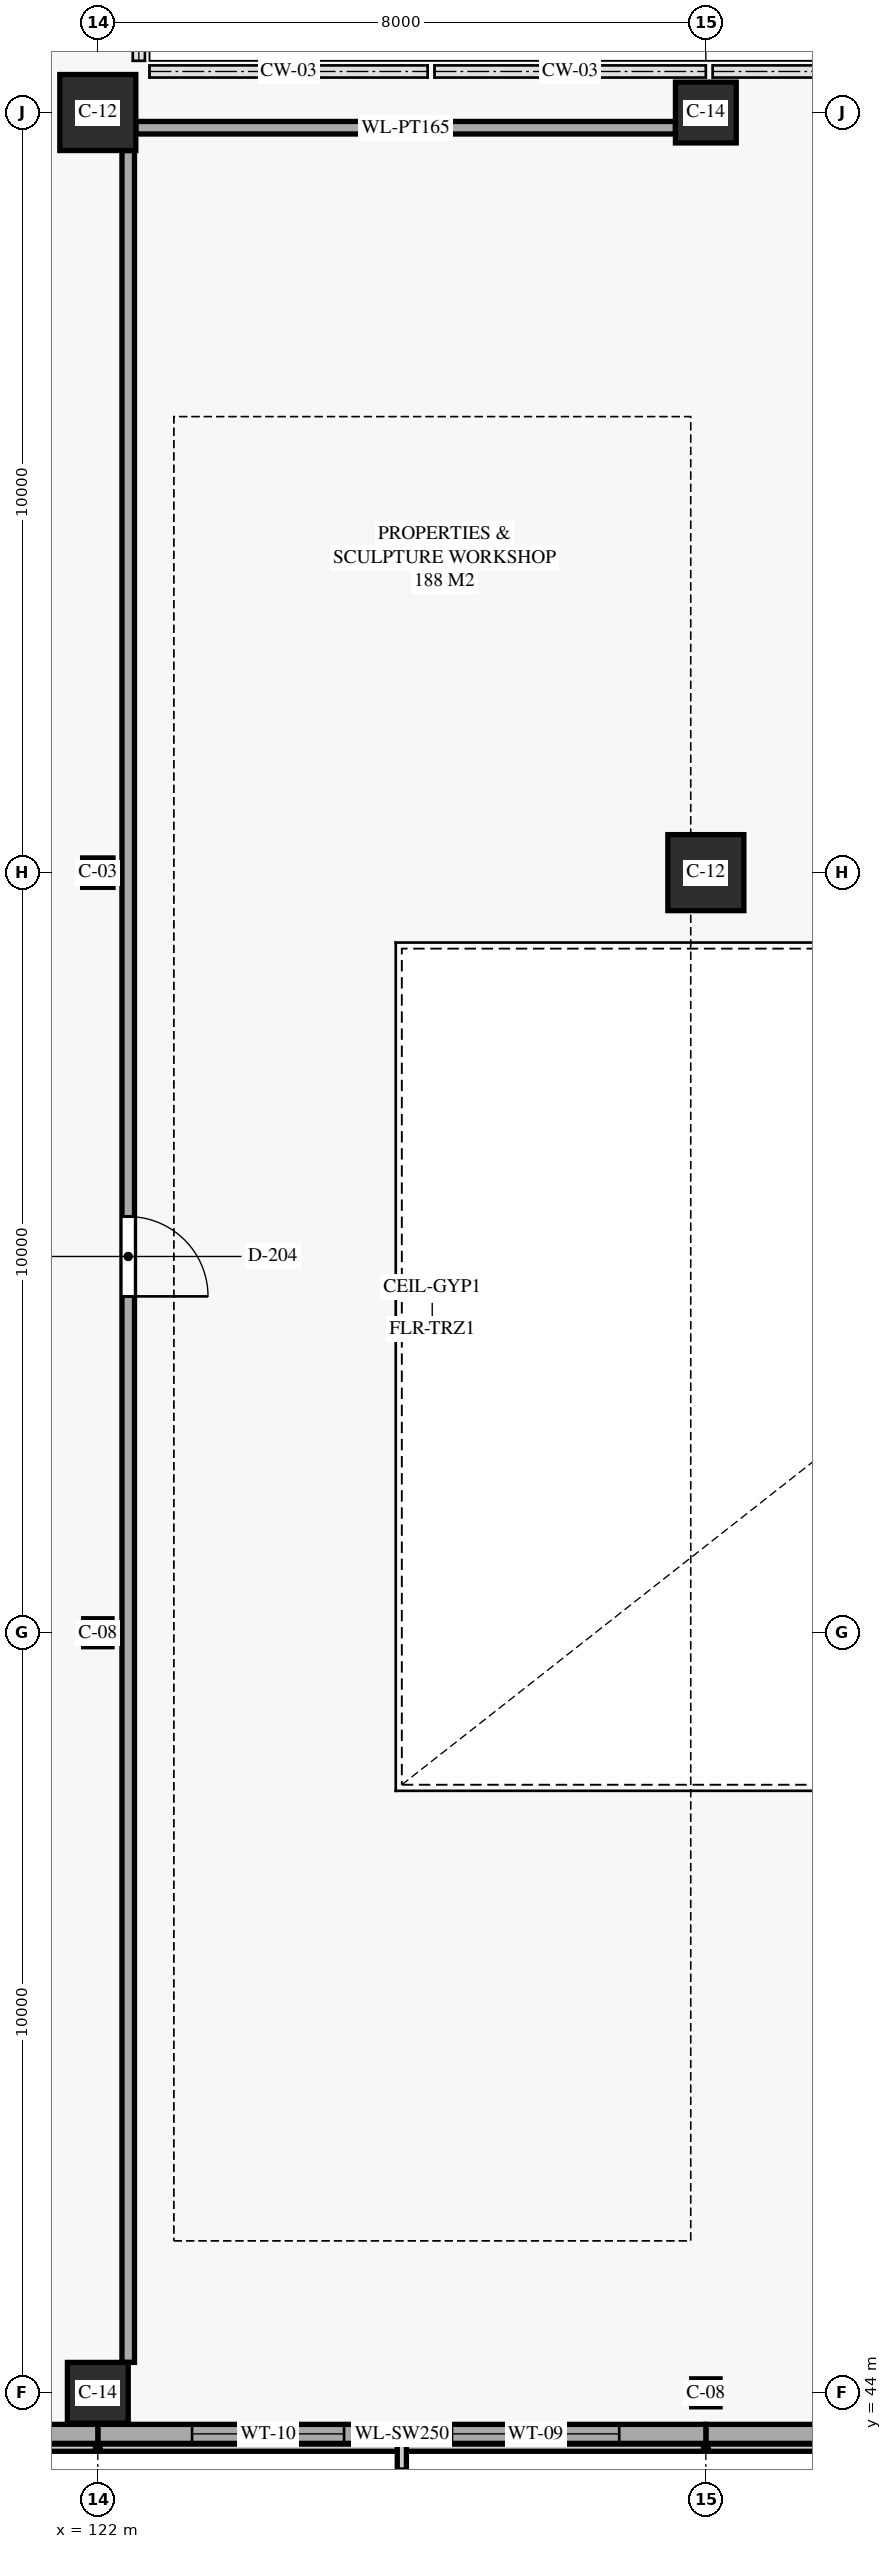
"""IFC4 building model, lengths in metres.
Left out: names, types, materials, properties, quantities, classifications, styles, units other than length and angle.
Written with IfcOpenShell. Run it as: python <this file> out.ifc"""

import sys

from ifc_helpers import new_model, si_unit, direction, frame, frame_2d, origin, origin_2d, place, context, subcontext, project, spatial, rectangle, i_section, extrude, element, fill, save


model = new_model("IFC4")
c1 = context("Model", 3, precision=1e-05, world=origin(), true_north=direction((0.0, 1.0)))
c2 = subcontext(c1, "Body", "Model", "MODEL_VIEW")
j1 = project(units=[si_unit("LENGTHUNIT", "METRE"), si_unit("PLANEANGLEUNIT", "RADIAN")], contexts=[c1])
p1 = place(None, origin())
s1 = spatial("IfcSite", under=j1, at=p1, CompositionType="ELEMENT")
p2 = place(p1, origin())
s2 = spatial("IfcBuilding", under=s1, at=p2, CompositionType="ELEMENT")
p3 = place(p2, frame((0.0, 0.0, 5.0)))
s3 = spatial("IfcBuildingStorey", under=s2, at=p3, CompositionType="ELEMENT", Elevation=5.0)
p4 = place(p3, frame((122.0, 44.0, 0.0), z_axis=(0.0, 0.0, 1.0), x_axis=(1.0, 0.0, 0.0)))
e1 = element("IfcColumn", 1, at=p4, inside=s3, PredefinedType="COLUMN", context=c2, shape_type="SweptSolid", body=[
    extrude(rectangle(XDim=0.8, YDim=0.8, at=origin_2d()), origin(), (0.0, 0.0, 1.0), 5.0),
])
p5 = place(p3, frame((122.0, 54.0, 0.0), z_axis=(0.0, 0.0, 1.0), x_axis=(1.0, 0.0, 0.0)))
e2 = element("IfcColumn", 2, at=p5, inside=s3, PredefinedType="COLUMN", context=c2, shape_type="SweptSolid", body=[
    extrude(i_section(OverallWidth=0.373, OverallDepth=0.368, WebThickness=0.015, FlangeThickness=0.024, FilletRadius=0.015, at=origin_2d()), origin(), (0.0, 0.0, 1.0), 5.0),
])
p6 = place(p3, frame((122.0, 64.0, 0.0), z_axis=(0.0, 0.0, 1.0), x_axis=(1.0, 0.0, 0.0)))
e3 = element("IfcColumn", 3, at=p6, inside=s3, PredefinedType="COLUMN", context=c2, shape_type="SweptSolid", body=[
    extrude(i_section(OverallWidth=0.399, OverallDepth=0.386, WebThickness=0.021, FlangeThickness=0.033, FilletRadius=0.016, at=origin_2d()), origin(), (0.0, 0.0, 1.0), 5.0),
])
p7 = place(p3, frame((122.0, 74.0, 0.0), z_axis=(0.0, 0.0, 1.0), x_axis=(1.0, 0.0, 0.0)))
e4 = element("IfcColumn", 4, at=p7, inside=s3, PredefinedType="COLUMN", context=c2, shape_type="SweptSolid", body=[
    extrude(rectangle(XDim=1.0, YDim=1.0, at=origin_2d()), origin(), (0.0, 0.0, 1.0), 5.0),
])
p8 = place(p3, frame((130.0, 44.0, 0.0), z_axis=(0.0, 0.0, 1.0), x_axis=(1.0, 0.0, 0.0)))
e5 = element("IfcColumn", 5, at=p8, inside=s3, PredefinedType="COLUMN", context=c2, shape_type="SweptSolid", body=[
    extrude(i_section(OverallWidth=0.373, OverallDepth=0.368, WebThickness=0.015, FlangeThickness=0.024, FilletRadius=0.015, at=origin_2d()), origin(), (0.0, 0.0, 1.0), 5.0),
])
p9 = place(p3, frame((130.0, 64.0, 0.0), z_axis=(0.0, 0.0, 1.0), x_axis=(1.0, 0.0, 0.0)))
e6 = element("IfcColumn", 6, at=p9, inside=s3, PredefinedType="COLUMN", context=c2, shape_type="SweptSolid", body=[
    extrude(rectangle(XDim=1.0, YDim=1.0, at=origin_2d()), origin(), (0.0, 0.0, 1.0), 5.0),
])
p10 = place(p3, frame((130.0, 74.0, 0.0), z_axis=(0.0, 0.0, 1.0), x_axis=(1.0, 0.0, 0.0)))
e7 = element("IfcColumn", 7, at=p10, inside=s3, PredefinedType="COLUMN", context=c2, shape_type="SweptSolid", body=[
    extrude(rectangle(XDim=0.8, YDim=0.8, at=origin_2d()), origin(), (0.0, 0.0, 1.0), 5.0),
])
p11 = place(p3, frame((139.0, 43.46, 0.0), z_axis=(0.0, 0.0, 1.0), x_axis=(-1.0, 0.0, 0.0)))
e8 = element("IfcWall", 8, at=p11, inside=s3, PredefinedType="SOLIDWALL", context=c2, shape_type="SweptSolid", body=[
    extrude(rectangle(XDim=9.0, YDim=0.25, at=frame_2d((4.5, 0.0))), origin(), (0.0, 0.0, 1.0), 4.68),
])
p12 = place(p11, frame((1.92, 0.0, 0.65)))
e9 = element("IfcOpeningElement", 9, at=p12, cuts=e8, PredefinedType="OPENING", context=c2, shape_type="SweptSolid", body=[
    extrude(rectangle(XDim=1.2, YDim=2.3, at=frame_2d((0.6, 1.15))), frame((0.0, 0.135, 0.0), z_axis=(0.0, -1.0, 0.0), x_axis=(1.0, 0.0, 0.0)), (0.0, 0.0, 1.0), 0.27),
])
p13 = place(p11, frame((5.58, 0.0, 0.65)))
e10 = element("IfcOpeningElement", 10, at=p13, cuts=e8, PredefinedType="OPENING", context=c2, shape_type="SweptSolid", body=[
    extrude(rectangle(XDim=1.8, YDim=2.05, at=frame_2d((0.9, 1.025))), frame((0.0, 0.135, 0.0), z_axis=(0.0, -1.0, 0.0), x_axis=(1.0, 0.0, 0.0)), (0.0, 0.0, 1.0), 0.27),
])
p14 = place(p3, frame((130.0, 43.46, 0.0), z_axis=(0.0, 0.0, 1.0), x_axis=(-1.0, 0.0, 0.0)))
e11 = element("IfcWall", 11, at=p14, inside=s3, PredefinedType="SOLIDWALL", context=c2, shape_type="SweptSolid", body=[
    extrude(rectangle(XDim=8.0, YDim=0.25, at=frame_2d((4.0, 0.0))), origin(), (0.0, 0.0, 1.0), 4.68),
])
p15 = place(p14, frame((1.14, 0.0, 0.65)))
e12 = element("IfcOpeningElement", 12, at=p15, cuts=e11, PredefinedType="OPENING", context=c2, shape_type="SweptSolid", body=[
    extrude(rectangle(XDim=2.2, YDim=2.05, at=frame_2d((1.1, 1.025))), frame((0.0, 0.135, 0.0), z_axis=(0.0, -1.0, 0.0), x_axis=(1.0, 0.0, 0.0)), (0.0, 0.0, 1.0), 0.27),
])
p16 = place(p14, frame((4.76, 0.0, 0.65)))
e13 = element("IfcOpeningElement", 13, at=p16, cuts=e11, PredefinedType="OPENING", context=c2, shape_type="SweptSolid", body=[
    extrude(rectangle(XDim=2.0, YDim=2.05, at=frame_2d((1.0, 1.025))), frame((0.0, 0.135, 0.0), z_axis=(0.0, -1.0, 0.0), x_axis=(1.0, 0.0, 0.0)), (0.0, 0.0, 1.0), 0.27),
])
p17 = place(p3, frame((122.0, 43.46, 0.0), z_axis=(0.0, 0.0, 1.0), x_axis=(-1.0, 0.0, 0.0)))
e14 = element("IfcWall", 14, at=p17, inside=s3, PredefinedType="SOLIDWALL", context=c2, shape_type="SweptSolid", body=[
    extrude(rectangle(XDim=7.32, YDim=0.25, at=frame_2d((3.66, 0.0))), origin(), (0.0, 0.0, 1.0), 4.68),
])
p18 = place(p17, frame((1.15, 0.0, 0.65)))
e15 = element("IfcOpeningElement", 15, at=p18, cuts=e14, PredefinedType="OPENING", context=c2, shape_type="SweptSolid", body=[
    extrude(rectangle(XDim=1.8, YDim=2.05, at=frame_2d((0.9, 1.025))), frame((0.0, 0.135, 0.0), z_axis=(0.0, -1.0, 0.0), x_axis=(1.0, 0.0, 0.0)), (0.0, 0.0, 1.0), 0.27),
])
p19 = place(p17, frame((4.47, 0.0, 0.65)))
e16 = element("IfcOpeningElement", 16, at=p19, cuts=e14, PredefinedType="OPENING", context=c2, shape_type="SweptSolid", body=[
    extrude(rectangle(XDim=1.6, YDim=2.05, at=frame_2d((0.8, 1.025))), frame((0.0, 0.135, 0.0), z_axis=(0.0, -1.0, 0.0), x_axis=(1.0, 0.0, 0.0)), (0.0, 0.0, 1.0), 0.27),
])
p20 = place(p3, frame((129.6, 73.8, 0.0), z_axis=(0.0, 0.0, 1.0), x_axis=(-1.0, 0.0, 0.0)))
e17 = element("IfcWall", 17, at=p20, inside=s3, PredefinedType="PARTITIONING", context=c2, shape_type="SweptSolid", body=[
    extrude(rectangle(XDim=7.1, YDim=0.165, at=frame_2d((3.55, 0.0))), origin(), (0.0, 0.0, 1.0), 4.01),
])
p21 = place(p3, frame((122.4, 73.5, 0.0), z_axis=(0.0, 0.0, 1.0), x_axis=(0.0, -1.0, 0.0)))
e18 = element("IfcWall", 18, at=p21, inside=s3, PredefinedType="PARTITIONING", context=c2, shape_type="SweptSolid", body=[
    extrude(rectangle(XDim=29.1, YDim=0.165, at=frame_2d((14.55, 0.0))), origin(), (0.0, 0.0, 1.0), 3.91),
])
p22 = place(p21, frame((14.025, 0.0, 0.0)))
e19 = element("IfcOpeningElement", 19, at=p22, cuts=e18, PredefinedType="OPENING", context=c2, shape_type="SweptSolid", body=[
    extrude(rectangle(XDim=1.05, YDim=2.2, at=frame_2d((0.525, 1.1))), frame((0.0, 0.093, 0.0), z_axis=(0.0, -1.0, 0.0), x_axis=(1.0, 0.0, 0.0)), (0.0, 0.0, 1.0), 0.185),
])
p23 = place(p15, origin())
e20 = element("IfcWindow", 20, at=p23, inside=s3, PartitioningType="SINGLE_PANEL", PredefinedType="WINDOW", context=c2, shape_type="SweptSolid", body=[
    extrude(rectangle(XDim=2.2, YDim=2.05, at=frame_2d((1.1, 1.025))), frame((0.0, 0.03, 0.0), z_axis=(0.0, -1.0, 0.0), x_axis=(1.0, 0.0, 0.0)), (0.0, 0.0, 1.0), 0.06),
])
fill(e12, e20)
p24 = place(p16, origin())
e21 = element("IfcWindow", 21, at=p24, inside=s3, PartitioningType="SINGLE_PANEL", PredefinedType="WINDOW", context=c2, shape_type="SweptSolid", body=[
    extrude(rectangle(XDim=2.0, YDim=2.05, at=frame_2d((1.0, 1.025))), frame((0.0, 0.03, 0.0), z_axis=(0.0, -1.0, 0.0), x_axis=(1.0, 0.0, 0.0)), (0.0, 0.0, 1.0), 0.06),
])
fill(e13, e21)
p25 = place(p22, origin())
e22 = element("IfcDoor", 22, at=p25, inside=s3, OperationType="SINGLE_SWING_RIGHT", PredefinedType="DOOR", context=c2, shape_type="SweptSolid", body=[
    extrude(rectangle(XDim=1.05, YDim=2.2, at=frame_2d((0.525, 1.1))), frame((0.0, 0.025, 0.0), z_axis=(0.0, -1.0, 0.0), x_axis=(1.0, 0.0, 0.0)), (0.0, 0.0, 1.0), 0.05),
])
fill(e19, e22)
save(model, sys.argv[1])
